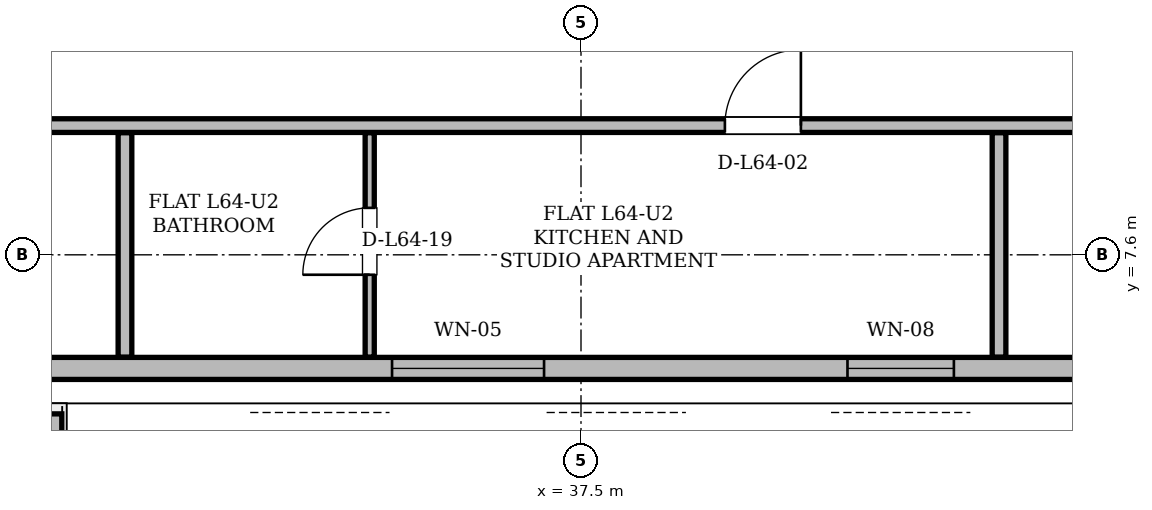
"""IFC4 building model, lengths in metres.
Left out: names, types, materials, properties, quantities, classifications, styles, units other than length and angle.
Written with IfcOpenShell. Run it as: python <this file> out.ifc"""

import sys

from ifc_helpers import new_model, si_unit, direction, frame, frame_2d, origin, place, context, subcontext, project, spatial, polyline, rectangle, outline, extrude, element, fill, save


model = new_model("IFC4")
c1 = context("Model", 3, precision=1e-05, world=origin(), true_north=direction((0.0, 1.0)))
c2 = subcontext(c1, "Body", "Model", "MODEL_VIEW")
j1 = project(units=[si_unit("LENGTHUNIT", "METRE"), si_unit("PLANEANGLEUNIT", "RADIAN")], contexts=[c1])
p1 = place(None, origin())
s1 = spatial("IfcSite", under=j1, at=p1, CompositionType="ELEMENT")
p2 = place(p1, origin())
s2 = spatial("IfcBuilding", under=s1, at=p2, CompositionType="ELEMENT")
p3 = place(p2, frame((0.0, 0.0, 241.5)))
s3 = spatial("IfcBuildingStorey", under=s2, at=p3, CompositionType="ELEMENT", Elevation=241.5)
p4 = place(p3, frame((19.024, 6.105, 0.0), z_axis=(0.0, 0.0, 1.0), x_axis=(1.0, 0.0, 0.0)))
e1 = element("IfcWall", 1, at=p4, inside=s3, PredefinedType="SOLIDWALL", context=c2, shape_type="SweptSolid", body=[
    extrude(rectangle(XDim=36.951, YDim=0.29, at=frame_2d((18.476, 0.0))), origin(), (0.0, 0.0, 1.0), 2.637),
])
p5 = place(p4, frame((8.034, 0.0, 0.0)))
e2 = element("IfcOpeningElement", 2, at=p5, cuts=e1, PredefinedType="OPENING", context=c2, shape_type="SweptSolid", body=[
    extrude(rectangle(XDim=1.5, YDim=2.2, at=frame_2d((0.75, 1.1))), frame((0.0, 0.145, 0.0), z_axis=(0.0, -1.0, 0.0), x_axis=(1.0, 0.0, 0.0)), (0.0, 0.0, 1.0), 0.29),
])
p6 = place(p4, frame((31.812, 0.0, 0.0)))
e3 = element("IfcOpeningElement", 3, at=p6, cuts=e1, PredefinedType="OPENING", context=c2, shape_type="SweptSolid", body=[
    extrude(rectangle(XDim=1.5, YDim=2.2, at=frame_2d((0.75, 1.1))), frame((0.0, 0.145, 0.0), z_axis=(0.0, -1.0, 0.0), x_axis=(1.0, 0.0, 0.0)), (0.0, 0.0, 1.0), 0.29),
])
p7 = place(p4, frame((2.494, 0.0, 0.85)))
e4 = element("IfcOpeningElement", 4, at=p7, cuts=e1, PredefinedType="OPENING", context=c2, shape_type="SweptSolid", body=[
    extrude(rectangle(XDim=2.4, YDim=1.677, at=frame_2d((1.2, 0.838))), frame((0.0, 0.145, 0.0), z_axis=(0.0, -1.0, 0.0), x_axis=(1.0, 0.0, 0.0)), (0.0, 0.0, 1.0), 0.29),
])
p8 = place(p4, frame((15.99, 0.0, 0.85)))
e5 = element("IfcOpeningElement", 5, at=p8, cuts=e1, PredefinedType="OPENING", context=c2, shape_type="SweptSolid", body=[
    extrude(rectangle(XDim=2.0, YDim=1.677, at=frame_2d((1.0, 0.838))), frame((0.0, 0.145, 0.0), z_axis=(0.0, -1.0, 0.0), x_axis=(1.0, 0.0, 0.0)), (0.0, 0.0, 1.0), 0.29),
])
p9 = place(p4, frame((21.982, 0.0, 0.85)))
e6 = element("IfcOpeningElement", 6, at=p9, cuts=e1, PredefinedType="OPENING", context=c2, shape_type="SweptSolid", body=[
    extrude(rectangle(XDim=1.4, YDim=1.6, at=frame_2d((0.7, 0.8))), frame((0.0, 0.145, 0.0), z_axis=(0.0, -1.0, 0.0), x_axis=(1.0, 0.0, 0.0)), (0.0, 0.0, 1.0), 0.29),
])
p10 = place(p4, frame((27.249, 0.0, 0.85)))
e7 = element("IfcOpeningElement", 7, at=p10, cuts=e1, PredefinedType="OPENING", context=c2, shape_type="SweptSolid", body=[
    extrude(rectangle(XDim=1.6, YDim=1.677, at=frame_2d((0.8, 0.838))), frame((0.0, 0.145, 0.0), z_axis=(0.0, -1.0, 0.0), x_axis=(1.0, 0.0, 0.0)), (0.0, 0.0, 1.0), 0.29),
])
p11 = place(p3, frame((30.554, 5.508, 0.0), z_axis=(0.0, 0.0, 1.0), x_axis=(0.0, -1.0, 0.0)))
e8 = element("IfcWall", 8, at=p11, inside=s3, PredefinedType="PARAPET", context=c2, shape_type="SweptSolid", body=[
    extrude(outline(polyline([(0.0, 0.0), (2.042, 0.0), (2.042, 1.1), (0.0, 1.32), (0.0, 0.0)])), frame((0.0, 0.115, 0.0), z_axis=(0.0, -1.0, 0.0), x_axis=(1.0, 0.0, 0.0)), (0.0, 0.0, 1.0), 0.23),
])
p12 = place(p3, frame((25.6, 9.3, 0.0), z_axis=(0.0, 0.0, 1.0), x_axis=(1.0, 0.0, 0.0)))
e9 = element("IfcWall", 9, at=p12, inside=s3, PredefinedType="PARTITIONING", context=c2, shape_type="SweptSolid", body=[
    extrude(rectangle(XDim=21.85, YDim=0.18, at=frame_2d((10.925, 0.0))), origin(), (0.0, 0.0, 1.0), 2.873),
])
p13 = place(p12, frame((2.325, 0.0, 0.0)))
e10 = element("IfcOpeningElement", 10, at=p13, cuts=e9, PredefinedType="OPENING", context=c2, shape_type="SweptSolid", body=[
    extrude(rectangle(XDim=1.0, YDim=2.18, at=frame_2d((0.5, 1.09))), frame((0.0, 0.09, 0.0), z_axis=(0.0, -1.0, 0.0), x_axis=(1.0, 0.0, 0.0)), (0.0, 0.0, 1.0), 0.18),
])
p14 = place(p12, frame((13.793, 0.0, 0.0)))
e11 = element("IfcOpeningElement", 11, at=p14, cuts=e9, PredefinedType="OPENING", context=c2, shape_type="SweptSolid", body=[
    extrude(rectangle(XDim=1.0, YDim=2.18, at=frame_2d((0.5, 1.09))), frame((0.0, 0.09, 0.0), z_axis=(0.0, -1.0, 0.0), x_axis=(1.0, 0.0, 0.0)), (0.0, 0.0, 1.0), 0.18),
])
p15 = place(p12, frame((18.812, 0.0, 0.0)))
e12 = element("IfcOpeningElement", 12, at=p15, cuts=e9, PredefinedType="OPENING", context=c2, shape_type="SweptSolid", body=[
    extrude(rectangle(XDim=1.0, YDim=2.18, at=frame_2d((0.5, 1.09))), frame((0.0, 0.09, 0.0), z_axis=(0.0, -1.0, 0.0), x_axis=(1.0, 0.0, 0.0)), (0.0, 0.0, 1.0), 0.18),
])
p16 = place(p3, frame((31.5, 6.254, 0.0), z_axis=(0.0, 0.0, 1.0), x_axis=(0.0, 1.0, 0.0)))
e13 = element("IfcWall", 13, at=p16, inside=s3, PredefinedType="PARTITIONING", context=c2, shape_type="SweptSolid", body=[
    extrude(rectangle(XDim=2.952, YDim=0.18, at=frame_2d((1.476, 0.0))), origin(), (0.0, 0.0, 1.0), 2.926),
])
p17 = place(p3, frame((34.72, 6.254, 0.0), z_axis=(0.0, 0.0, 1.0), x_axis=(0.0, 1.0, 0.0)))
e14 = element("IfcWall", 14, at=p17, inside=s3, PredefinedType="PARTITIONING", context=c2, shape_type="SweptSolid", body=[
    extrude(rectangle(XDim=2.952, YDim=0.12, at=frame_2d((1.476, 0.0))), origin(), (0.0, 0.0, 1.0), 3.34),
])
p18 = place(p17, frame((1.083, 0.0, 0.0)))
e15 = element("IfcOpeningElement", 15, at=p18, cuts=e14, PredefinedType="OPENING", context=c2, shape_type="SweptSolid", body=[
    extrude(rectangle(XDim=0.88, YDim=2.08, at=frame_2d((0.44, 1.04))), frame((0.0, 0.06, 0.0), z_axis=(0.0, -1.0, 0.0), x_axis=(1.0, 0.0, 0.0)), (0.0, 0.0, 1.0), 0.12),
])
p19 = place(p3, frame((43.0, 6.254, 0.0), z_axis=(0.0, 0.0, 1.0), x_axis=(0.0, 1.0, 0.0)))
e16 = element("IfcWall", 16, at=p19, inside=s3, PredefinedType="PARTITIONING", context=c2, shape_type="SweptSolid", body=[
    extrude(rectangle(XDim=2.952, YDim=0.18, at=frame_2d((1.476, 0.0))), origin(), (0.0, 0.0, 1.0), 3.34),
])
p20 = place(p8, origin())
e17 = element("IfcWindow", 17, at=p20, inside=s3, PartitioningType="SINGLE_PANEL", PredefinedType="WINDOW", context=c2, shape_type="SweptSolid", body=[
    extrude(rectangle(XDim=2.0, YDim=1.677, at=frame_2d((1.0, 0.838))), frame((0.0, 0.03, 0.0), z_axis=(0.0, -1.0, 0.0), x_axis=(1.0, 0.0, 0.0)), (0.0, 0.0, 1.0), 0.06),
])
fill(e5, e17)
p21 = place(p9, origin())
e18 = element("IfcWindow", 18, at=p21, inside=s3, PartitioningType="SINGLE_PANEL", PredefinedType="WINDOW", context=c2, shape_type="SweptSolid", body=[
    extrude(rectangle(XDim=1.4, YDim=1.6, at=frame_2d((0.7, 0.8))), frame((0.0, 0.03, 0.0), z_axis=(0.0, -1.0, 0.0), x_axis=(1.0, 0.0, 0.0)), (0.0, 0.0, 1.0), 0.06),
])
fill(e6, e18)
p22 = place(p14, origin())
e19 = element("IfcDoor", 19, at=p22, inside=s3, OperationType="SINGLE_SWING_RIGHT", PredefinedType="DOOR", context=c2, shape_type="SweptSolid", body=[
    extrude(rectangle(XDim=1.0, YDim=2.18, at=frame_2d((0.5, 1.09))), frame((0.0, 0.025, 0.0), z_axis=(0.0, -1.0, 0.0), x_axis=(1.0, 0.0, 0.0)), (0.0, 0.0, 1.0), 0.05),
])
fill(e11, e19)
p23 = place(p18, origin())
e20 = element("IfcDoor", 20, at=p23, inside=s3, OperationType="SINGLE_SWING_LEFT", PredefinedType="DOOR", context=c2, shape_type="SweptSolid", body=[
    extrude(rectangle(XDim=0.88, YDim=2.08, at=frame_2d((0.44, 1.04))), frame((0.0, 0.025, 0.0), z_axis=(0.0, -1.0, 0.0), x_axis=(1.0, 0.0, 0.0)), (0.0, 0.0, 1.0), 0.05),
])
fill(e15, e20)
save(model, sys.argv[1])
